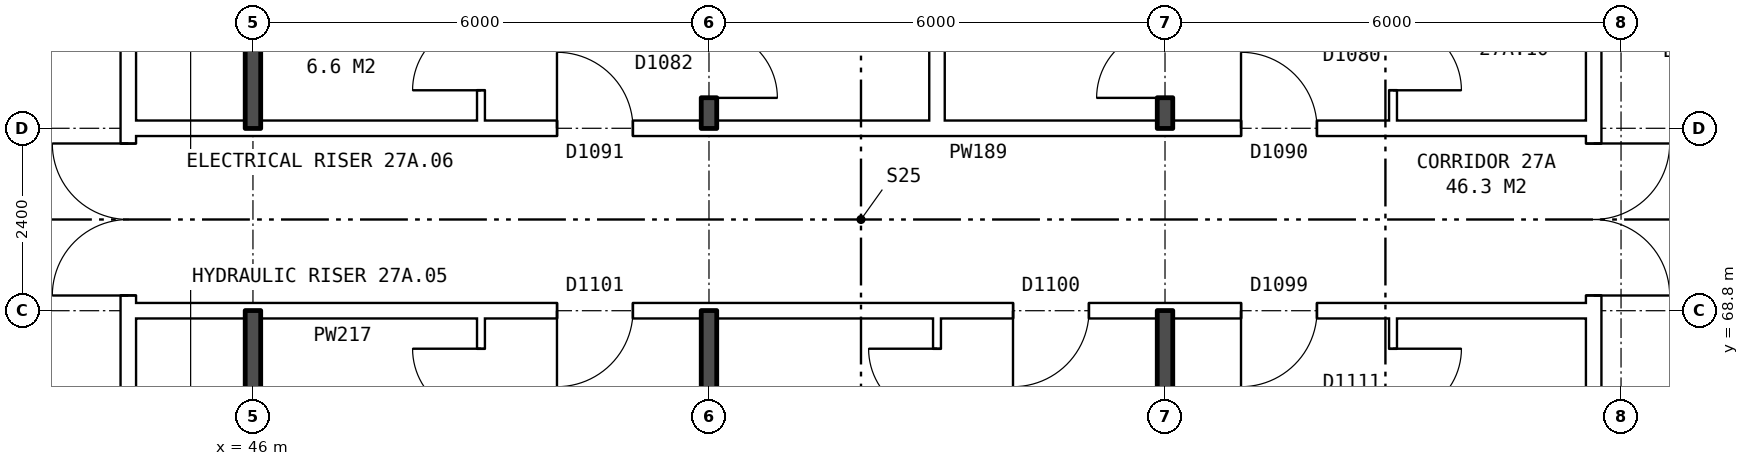
"""IFC4 building model, lengths in metres.
Left out: names, types, materials, properties, quantities, classifications, styles, units other than length and angle.
Written with IfcOpenShell. Run it as: python <this file> out.ifc"""

import sys

from ifc_helpers import new_model, si_unit, direction, frame, frame_2d, origin, place, context, subcontext, project, spatial, rectangle, extrude, element, fill, save


model = new_model("IFC4")
c1 = context("Model", 3, precision=1e-05, world=origin(), true_north=direction((0.0, 1.0)))
c2 = subcontext(c1, "Body", "Model", "MODEL_VIEW")
j1 = project(units=[si_unit("LENGTHUNIT", "METRE"), si_unit("PLANEANGLEUNIT", "RADIAN")], contexts=[c1])
p1 = place(None, origin())
s1 = spatial("IfcSite", under=j1, at=p1, CompositionType="ELEMENT")
p2 = place(p1, origin())
s2 = spatial("IfcBuilding", under=s1, at=p2, CompositionType="ELEMENT")
p3 = place(p2, frame((0.0, 0.0, 99.5)))
s3 = spatial("IfcBuildingStorey", under=s2, at=p3, CompositionType="ELEMENT", Elevation=99.5)
p4 = place(p3, frame((63.64, 63.9, 0.0), z_axis=(0.0, 0.0, 1.0), x_axis=(0.0, 1.0, 0.0)))
e1 = element("IfcWall", 1, at=p4, inside=s3, PredefinedType="PARTITIONING", context=c2, shape_type="SweptSolid", body=[
    extrude(rectangle(XDim=12.2, YDim=0.2, at=frame_2d((6.1, 0.0))), origin(), (0.0, 0.0, 1.0), 2.85),
])
p5 = place(p4, frame((5.1, 0.0, 0.0)))
e2 = element("IfcOpeningElement", 2, at=p5, cuts=e1, PredefinedType="OPENING", context=c2, shape_type="SweptSolid", body=[
    extrude(rectangle(XDim=2.0, YDim=2.1, at=frame_2d((1.0, 1.05))), frame((0.0, 0.11, 0.0), z_axis=(0.0, -1.0, 0.0), x_axis=(1.0, 0.0, 0.0)), (0.0, 0.0, 1.0), 0.22),
])
p6 = place(p3, frame((44.36, 63.9, 0.0), z_axis=(0.0, 0.0, 1.0), x_axis=(0.0, 1.0, 0.0)))
e3 = element("IfcWall", 3, at=p6, inside=s3, PredefinedType="PARTITIONING", context=c2, shape_type="SweptSolid", body=[
    extrude(rectangle(XDim=12.2, YDim=0.2, at=frame_2d((6.1, 0.0))), origin(), (0.0, 0.0, 1.0), 2.85),
])
p7 = place(p6, frame((5.1, 0.0, 0.0)))
e4 = element("IfcOpeningElement", 4, at=p7, cuts=e3, PredefinedType="OPENING", context=c2, shape_type="SweptSolid", body=[
    extrude(rectangle(XDim=2.0, YDim=2.1, at=frame_2d((1.0, 1.05))), frame((0.0, 0.11, 0.0), z_axis=(0.0, -1.0, 0.0), x_axis=(1.0, 0.0, 0.0)), (0.0, 0.0, 1.0), 0.22),
])
p8 = place(p3, frame((44.36, 68.8, 0.0), z_axis=(0.0, 0.0, 1.0), x_axis=(1.0, 0.0, 0.0)))
e5 = element("IfcWall", 5, at=p8, inside=s3, PredefinedType="PARTITIONING", context=c2, shape_type="SweptSolid", body=[
    extrude(rectangle(XDim=19.28, YDim=0.2, at=frame_2d((9.64, 0.0))), origin(), (0.0, 0.0, 1.0), 2.85),
])
p9 = place(p8, frame((14.64, 0.0, 0.0)))
e6 = element("IfcOpeningElement", 6, at=p9, cuts=e5, PredefinedType="OPENING", context=c2, shape_type="SweptSolid", body=[
    extrude(rectangle(XDim=1.0, YDim=2.1, at=frame_2d((0.5, 1.05))), frame((0.0, 0.11, 0.0), z_axis=(0.0, -1.0, 0.0), x_axis=(1.0, 0.0, 0.0)), (0.0, 0.0, 1.0), 0.22),
])
p10 = place(p8, frame((11.64, 0.0, 0.0)))
e7 = element("IfcOpeningElement", 7, at=p10, cuts=e5, PredefinedType="OPENING", context=c2, shape_type="SweptSolid", body=[
    extrude(rectangle(XDim=1.0, YDim=2.1, at=frame_2d((0.5, 1.05))), frame((0.0, 0.11, 0.0), z_axis=(0.0, -1.0, 0.0), x_axis=(1.0, 0.0, 0.0)), (0.0, 0.0, 1.0), 0.22),
])
p11 = place(p8, frame((5.64, 0.0, 0.0)))
e8 = element("IfcOpeningElement", 8, at=p11, cuts=e5, PredefinedType="OPENING", context=c2, shape_type="SweptSolid", body=[
    extrude(rectangle(XDim=1.0, YDim=2.1, at=frame_2d((0.5, 1.05))), frame((0.0, 0.11, 0.0), z_axis=(0.0, -1.0, 0.0), x_axis=(1.0, 0.0, 0.0)), (0.0, 0.0, 1.0), 0.22),
])
p12 = place(p3, frame((44.36, 71.2, 0.0), z_axis=(0.0, 0.0, 1.0), x_axis=(1.0, 0.0, 0.0)))
e9 = element("IfcWall", 9, at=p12, inside=s3, PredefinedType="PARTITIONING", context=c2, shape_type="SweptSolid", body=[
    extrude(rectangle(XDim=19.28, YDim=0.2, at=frame_2d((9.64, 0.0))), origin(), (0.0, 0.0, 1.0), 2.85),
])
p13 = place(p12, frame((14.64, 0.0, 0.0)))
e10 = element("IfcOpeningElement", 10, at=p13, cuts=e9, PredefinedType="OPENING", context=c2, shape_type="SweptSolid", body=[
    extrude(rectangle(XDim=1.0, YDim=2.1, at=frame_2d((0.5, 1.05))), frame((0.0, 0.11, 0.0), z_axis=(0.0, -1.0, 0.0), x_axis=(1.0, 0.0, 0.0)), (0.0, 0.0, 1.0), 0.22),
])
p14 = place(p12, frame((5.64, 0.0, 0.0)))
e11 = element("IfcOpeningElement", 11, at=p14, cuts=e9, PredefinedType="OPENING", context=c2, shape_type="SweptSolid", body=[
    extrude(rectangle(XDim=1.0, YDim=2.1, at=frame_2d((0.5, 1.05))), frame((0.0, 0.11, 0.0), z_axis=(0.0, -1.0, 0.0), x_axis=(1.0, 0.0, 0.0)), (0.0, 0.0, 1.0), 0.22),
])
for number, where, z_axis, x_axis in (
    (12, (46.0, 63.8, 0.0), (0.0, 0.0, 1.0), (0.0, 1.0, 0.0)),
    (13, (46.0, 71.2, 0.0), (0.0, 0.0, 1.0), (0.0, 1.0, 0.0)),
):
    element("IfcWall", number, at=place(p3, frame(where, z_axis=z_axis, x_axis=x_axis)), inside=s3, PredefinedType="SOLIDWALL", context=c2, shape_type="SweptSolid", body=[
        extrude(rectangle(XDim=5.0, YDim=0.2, at=frame_2d((2.5, 0.0))), origin(), (0.0, 0.0, 1.0), 2.85),
    ])
p15 = place(p3, frame((49.0, 54.36, 0.0), z_axis=(0.0, 0.0, 1.0), x_axis=(0.0, 1.0, 0.0)))
e14 = element("IfcWall", 14, at=p15, inside=s3, PredefinedType="PARTITIONING", context=c2, shape_type="SweptSolid", body=[
    extrude(rectangle(XDim=14.34, YDim=0.1, at=frame_2d((7.17, 0.0))), origin(), (0.0, 0.0, 1.0), 2.85),
])
p16 = place(p15, frame((7.7, 0.0, 0.0)))
e15 = element("IfcOpeningElement", 15, at=p16, cuts=e14, PredefinedType="OPENING", context=c2, shape_type="SweptSolid", body=[
    extrude(rectangle(XDim=0.9, YDim=2.1, at=frame_2d((0.45, 1.05))), frame((0.0, 0.06, 0.0), z_axis=(0.0, -1.0, 0.0), x_axis=(1.0, 0.0, 0.0)), (0.0, 0.0, 1.0), 0.12),
])
p17 = place(p15, frame((13.04, 0.0, 0.0)))
e16 = element("IfcOpeningElement", 16, at=p17, cuts=e14, PredefinedType="OPENING", context=c2, shape_type="SweptSolid", body=[
    extrude(rectangle(XDim=0.9, YDim=2.1, at=frame_2d((0.45, 1.05))), frame((0.0, 0.06, 0.0), z_axis=(0.0, -1.0, 0.0), x_axis=(1.0, 0.0, 0.0)), (0.0, 0.0, 1.0), 0.12),
])
p18 = place(p3, frame((49.0, 71.3, 0.0), z_axis=(0.0, 0.0, 1.0), x_axis=(0.0, 1.0, 0.0)))
e17 = element("IfcWall", 17, at=p18, inside=s3, PredefinedType="PARTITIONING", context=c2, shape_type="SweptSolid", body=[
    extrude(rectangle(XDim=14.34, YDim=0.1, at=frame_2d((7.17, 0.0))), origin(), (0.0, 0.0, 1.0), 2.85),
])
p19 = place(p18, frame((7.94, 0.0, 0.0)))
e18 = element("IfcOpeningElement", 18, at=p19, cuts=e17, PredefinedType="OPENING", context=c2, shape_type="SweptSolid", body=[
    extrude(rectangle(XDim=0.9, YDim=2.1, at=frame_2d((0.45, 1.05))), frame((0.0, 0.06, 0.0), z_axis=(0.0, -1.0, 0.0), x_axis=(1.0, 0.0, 0.0)), (0.0, 0.0, 1.0), 0.12),
])
p20 = place(p18, frame((0.4, 0.0, 0.0)))
e19 = element("IfcOpeningElement", 19, at=p20, cuts=e17, PredefinedType="OPENING", context=c2, shape_type="SweptSolid", body=[
    extrude(rectangle(XDim=0.9, YDim=2.1, at=frame_2d((0.45, 1.05))), frame((0.0, 0.06, 0.0), z_axis=(0.0, -1.0, 0.0), x_axis=(1.0, 0.0, 0.0)), (0.0, 0.0, 1.0), 0.12),
])
p21 = place(p3, frame((52.0, 54.36, 0.0), z_axis=(0.0, 0.0, 1.0), x_axis=(0.0, 1.0, 0.0)))
e20 = element("IfcWall", 20, at=p21, inside=s3, PredefinedType="SOLIDWALL", context=c2, shape_type="SweptSolid", body=[
    extrude(rectangle(XDim=14.44, YDim=0.2, at=frame_2d((7.22, 0.0))), origin(), (0.0, 0.0, 1.0), 2.85),
])
p22 = place(p3, frame((52.0, 71.2, 0.0), z_axis=(0.0, 0.0, 1.0), x_axis=(0.0, 1.0, 0.0)))
e21 = element("IfcWall", 21, at=p22, inside=s3, PredefinedType="SOLIDWALL", context=c2, shape_type="SweptSolid", body=[
    extrude(rectangle(XDim=14.44, YDim=0.2, at=frame_2d((7.22, 0.0))), origin(), (0.0, 0.0, 1.0), 2.85),
])
p23 = place(p22, frame((8.04, 0.0, 0.0)))
e22 = element("IfcOpeningElement", 22, at=p23, cuts=e21, PredefinedType="OPENING", context=c2, shape_type="SweptSolid", body=[
    extrude(rectangle(XDim=0.9, YDim=2.1, at=frame_2d((0.45, 1.05))), frame((0.0, 0.11, 0.0), z_axis=(0.0, -1.0, 0.0), x_axis=(1.0, 0.0, 0.0)), (0.0, 0.0, 1.0), 0.22),
])
p24 = place(p22, frame((0.4, 0.0, 0.0)))
e23 = element("IfcOpeningElement", 23, at=p24, cuts=e21, PredefinedType="OPENING", context=c2, shape_type="SweptSolid", body=[
    extrude(rectangle(XDim=0.9, YDim=2.1, at=frame_2d((0.45, 1.05))), frame((0.0, 0.11, 0.0), z_axis=(0.0, -1.0, 0.0), x_axis=(1.0, 0.0, 0.0)), (0.0, 0.0, 1.0), 0.22),
])
p25 = place(p3, frame((55.0, 54.36, 0.0), z_axis=(0.0, 0.0, 1.0), x_axis=(0.0, 1.0, 0.0)))
e24 = element("IfcWall", 24, at=p25, inside=s3, PredefinedType="PARTITIONING", context=c2, shape_type="SweptSolid", body=[
    extrude(rectangle(XDim=14.34, YDim=0.1, at=frame_2d((7.17, 0.0))), origin(), (0.0, 0.0, 1.0), 2.85),
])
p26 = place(p25, frame((4.2, 0.0, 0.0)))
e25 = element("IfcOpeningElement", 25, at=p26, cuts=e24, PredefinedType="OPENING", context=c2, shape_type="SweptSolid", body=[
    extrude(rectangle(XDim=0.9, YDim=2.1, at=frame_2d((0.45, 1.05))), frame((0.0, 0.06, 0.0), z_axis=(0.0, -1.0, 0.0), x_axis=(1.0, 0.0, 0.0)), (0.0, 0.0, 1.0), 0.12),
])
p27 = place(p25, frame((13.04, 0.0, 0.0)))
e26 = element("IfcOpeningElement", 26, at=p27, cuts=e24, PredefinedType="OPENING", context=c2, shape_type="SweptSolid", body=[
    extrude(rectangle(XDim=0.9, YDim=2.1, at=frame_2d((0.45, 1.05))), frame((0.0, 0.06, 0.0), z_axis=(0.0, -1.0, 0.0), x_axis=(1.0, 0.0, 0.0)), (0.0, 0.0, 1.0), 0.12),
])
p28 = place(p3, frame((55.0, 71.3, 0.0), z_axis=(0.0, 0.0, 1.0), x_axis=(0.0, 1.0, 0.0)))
e27 = element("IfcWall", 27, at=p28, inside=s3, PredefinedType="PARTITIONING", context=c2, shape_type="SweptSolid", body=[
    extrude(rectangle(XDim=14.34, YDim=0.2, at=frame_2d((7.17, 0.0))), origin(), (0.0, 0.0, 1.0), 2.85),
])
p29 = place(p3, frame((58.0, 54.36, 0.0), z_axis=(0.0, 0.0, 1.0), x_axis=(0.0, 1.0, 0.0)))
e28 = element("IfcWall", 28, at=p29, inside=s3, PredefinedType="SOLIDWALL", context=c2, shape_type="SweptSolid", body=[
    extrude(rectangle(XDim=14.44, YDim=0.2, at=frame_2d((7.22, 0.0))), origin(), (0.0, 0.0, 1.0), 2.85),
])
p30 = place(p3, frame((58.0, 71.2, 0.0), z_axis=(0.0, 0.0, 1.0), x_axis=(0.0, 1.0, 0.0)))
e29 = element("IfcWall", 29, at=p30, inside=s3, PredefinedType="SOLIDWALL", context=c2, shape_type="SweptSolid", body=[
    extrude(rectangle(XDim=14.44, YDim=0.2, at=frame_2d((7.22, 0.0))), origin(), (0.0, 0.0, 1.0), 2.85),
])
p31 = place(p30, frame((9.34, 0.0, 0.0)))
e30 = element("IfcOpeningElement", 30, at=p31, cuts=e29, PredefinedType="OPENING", context=c2, shape_type="SweptSolid", body=[
    extrude(rectangle(XDim=0.9, YDim=2.1, at=frame_2d((0.45, 1.05))), frame((0.0, 0.11, 0.0), z_axis=(0.0, -1.0, 0.0), x_axis=(1.0, 0.0, 0.0)), (0.0, 0.0, 1.0), 0.22),
])
p32 = place(p30, frame((0.4, 0.0, 0.0)))
e31 = element("IfcOpeningElement", 31, at=p32, cuts=e29, PredefinedType="OPENING", context=c2, shape_type="SweptSolid", body=[
    extrude(rectangle(XDim=0.9, YDim=2.1, at=frame_2d((0.45, 1.05))), frame((0.0, 0.11, 0.0), z_axis=(0.0, -1.0, 0.0), x_axis=(1.0, 0.0, 0.0)), (0.0, 0.0, 1.0), 0.22),
])
p33 = place(p3, frame((61.0, 54.36, 0.0), z_axis=(0.0, 0.0, 1.0), x_axis=(0.0, 1.0, 0.0)))
e32 = element("IfcWall", 32, at=p33, inside=s3, PredefinedType="PARTITIONING", context=c2, shape_type="SweptSolid", body=[
    extrude(rectangle(XDim=14.34, YDim=0.1, at=frame_2d((7.17, 0.0))), origin(), (0.0, 0.0, 1.0), 2.85),
])
p34 = place(p33, frame((4.2, 0.0, 0.0)))
e33 = element("IfcOpeningElement", 33, at=p34, cuts=e32, PredefinedType="OPENING", context=c2, shape_type="SweptSolid", body=[
    extrude(rectangle(XDim=0.9, YDim=2.1, at=frame_2d((0.45, 1.05))), frame((0.0, 0.06, 0.0), z_axis=(0.0, -1.0, 0.0), x_axis=(1.0, 0.0, 0.0)), (0.0, 0.0, 1.0), 0.12),
])
p35 = place(p33, frame((13.04, 0.0, 0.0)))
e34 = element("IfcOpeningElement", 34, at=p35, cuts=e32, PredefinedType="OPENING", context=c2, shape_type="SweptSolid", body=[
    extrude(rectangle(XDim=0.9, YDim=2.1, at=frame_2d((0.45, 1.05))), frame((0.0, 0.06, 0.0), z_axis=(0.0, -1.0, 0.0), x_axis=(1.0, 0.0, 0.0)), (0.0, 0.0, 1.0), 0.12),
])
p36 = place(p3, frame((61.0, 71.3, 0.0), z_axis=(0.0, 0.0, 1.0), x_axis=(0.0, 1.0, 0.0)))
e35 = element("IfcWall", 35, at=p36, inside=s3, PredefinedType="PARTITIONING", context=c2, shape_type="SweptSolid", body=[
    extrude(rectangle(XDim=14.34, YDim=0.1, at=frame_2d((7.17, 0.0))), origin(), (0.0, 0.0, 1.0), 2.85),
])
p37 = place(p36, frame((9.24, 0.0, 0.0)))
e36 = element("IfcOpeningElement", 36, at=p37, cuts=e35, PredefinedType="OPENING", context=c2, shape_type="SweptSolid", body=[
    extrude(rectangle(XDim=0.9, YDim=2.1, at=frame_2d((0.45, 1.05))), frame((0.0, 0.06, 0.0), z_axis=(0.0, -1.0, 0.0), x_axis=(1.0, 0.0, 0.0)), (0.0, 0.0, 1.0), 0.12),
])
p38 = place(p36, frame((0.4, 0.0, 0.0)))
e37 = element("IfcOpeningElement", 37, at=p38, cuts=e35, PredefinedType="OPENING", context=c2, shape_type="SweptSolid", body=[
    extrude(rectangle(XDim=0.9, YDim=2.1, at=frame_2d((0.45, 1.05))), frame((0.0, 0.06, 0.0), z_axis=(0.0, -1.0, 0.0), x_axis=(1.0, 0.0, 0.0)), (0.0, 0.0, 1.0), 0.12),
])
p39 = place(p5, frame((2.0, 0.0, 0.0), z_axis=(0.0, 0.0, 1.0), x_axis=(-1.0, 0.0, 0.0)))
e38 = element("IfcDoor", 38, at=p39, inside=s3, OperationType="DOUBLE_DOOR_SINGLE_SWING", PredefinedType="DOOR", context=c2, shape_type="SweptSolid", body=[
    extrude(rectangle(XDim=2.0, YDim=2.1, at=frame_2d((1.0, 1.05))), frame((0.0, 0.025, 0.0), z_axis=(0.0, -1.0, 0.0), x_axis=(1.0, 0.0, 0.0)), (0.0, 0.0, 1.0), 0.05),
])
fill(e2, e38)
p40 = place(p7, origin())
e39 = element("IfcDoor", 39, at=p40, inside=s3, OperationType="DOUBLE_DOOR_SINGLE_SWING", PredefinedType="DOOR", context=c2, shape_type="SweptSolid", body=[
    extrude(rectangle(XDim=2.0, YDim=2.1, at=frame_2d((1.0, 1.05))), frame((0.0, 0.025, 0.0), z_axis=(0.0, -1.0, 0.0), x_axis=(1.0, 0.0, 0.0)), (0.0, 0.0, 1.0), 0.05),
])
fill(e4, e39)
p41 = place(p9, frame((1.0, 0.0, 0.0), z_axis=(0.0, 0.0, 1.0), x_axis=(-1.0, 0.0, 0.0)))
e40 = element("IfcDoor", 40, at=p41, inside=s3, OperationType="SINGLE_SWING_RIGHT", PredefinedType="DOOR", context=c2, shape_type="SweptSolid", body=[
    extrude(rectangle(XDim=1.0, YDim=2.1, at=frame_2d((0.5, 1.05))), frame((0.0, 0.025, 0.0), z_axis=(0.0, -1.0, 0.0), x_axis=(1.0, 0.0, 0.0)), (0.0, 0.0, 1.0), 0.05),
])
fill(e6, e40)
p42 = place(p35, frame((0.9, 0.0, 0.0), z_axis=(0.0, 0.0, 1.0), x_axis=(-1.0, 0.0, 0.0)))
e41 = element("IfcDoor", 41, at=p42, inside=s3, OperationType="SINGLE_SWING_LEFT", PredefinedType="DOOR", context=c2, shape_type="SweptSolid", body=[
    extrude(rectangle(XDim=0.9, YDim=2.1, at=frame_2d((0.45, 1.05))), frame((0.0, 0.025, 0.0), z_axis=(0.0, -1.0, 0.0), x_axis=(1.0, 0.0, 0.0)), (0.0, 0.0, 1.0), 0.05),
])
fill(e34, e41)
p43 = place(p10, frame((1.0, 0.0, 0.0), z_axis=(0.0, 0.0, 1.0), x_axis=(-1.0, 0.0, 0.0)))
e42 = element("IfcDoor", 42, at=p43, inside=s3, OperationType="SINGLE_SWING_RIGHT", PredefinedType="DOOR", context=c2, shape_type="SweptSolid", body=[
    extrude(rectangle(XDim=1.0, YDim=2.1, at=frame_2d((0.5, 1.05))), frame((0.0, 0.025, 0.0), z_axis=(0.0, -1.0, 0.0), x_axis=(1.0, 0.0, 0.0)), (0.0, 0.0, 1.0), 0.05),
])
fill(e7, e42)
p44 = place(p27, origin())
e43 = element("IfcDoor", 43, at=p44, inside=s3, OperationType="SINGLE_SWING_RIGHT", PredefinedType="DOOR", context=c2, shape_type="SweptSolid", body=[
    extrude(rectangle(XDim=0.9, YDim=2.1, at=frame_2d((0.45, 1.05))), frame((0.0, 0.025, 0.0), z_axis=(0.0, -1.0, 0.0), x_axis=(1.0, 0.0, 0.0)), (0.0, 0.0, 1.0), 0.05),
])
fill(e26, e43)
p45 = place(p11, frame((1.0, 0.0, 0.0), z_axis=(0.0, 0.0, 1.0), x_axis=(-1.0, 0.0, 0.0)))
e44 = element("IfcDoor", 44, at=p45, inside=s3, OperationType="SINGLE_SWING_RIGHT", PredefinedType="DOOR", context=c2, shape_type="SweptSolid", body=[
    extrude(rectangle(XDim=1.0, YDim=2.1, at=frame_2d((0.5, 1.05))), frame((0.0, 0.025, 0.0), z_axis=(0.0, -1.0, 0.0), x_axis=(1.0, 0.0, 0.0)), (0.0, 0.0, 1.0), 0.05),
])
fill(e8, e44)
p46 = place(p17, origin())
e45 = element("IfcDoor", 45, at=p46, inside=s3, OperationType="SINGLE_SWING_RIGHT", PredefinedType="DOOR", context=c2, shape_type="SweptSolid", body=[
    extrude(rectangle(XDim=0.9, YDim=2.1, at=frame_2d((0.45, 1.05))), frame((0.0, 0.025, 0.0), z_axis=(0.0, -1.0, 0.0), x_axis=(1.0, 0.0, 0.0)), (0.0, 0.0, 1.0), 0.05),
])
fill(e16, e45)
p47 = place(p13, origin())
e46 = element("IfcDoor", 46, at=p47, inside=s3, OperationType="SINGLE_SWING_LEFT", PredefinedType="DOOR", context=c2, shape_type="SweptSolid", body=[
    extrude(rectangle(XDim=1.0, YDim=2.1, at=frame_2d((0.5, 1.05))), frame((0.0, 0.025, 0.0), z_axis=(0.0, -1.0, 0.0), x_axis=(1.0, 0.0, 0.0)), (0.0, 0.0, 1.0), 0.05),
])
fill(e10, e46)
p48 = place(p38, frame((0.9, 0.0, 0.0), z_axis=(0.0, 0.0, 1.0), x_axis=(-1.0, 0.0, 0.0)))
e47 = element("IfcDoor", 47, at=p48, inside=s3, OperationType="SINGLE_SWING_RIGHT", PredefinedType="DOOR", context=c2, shape_type="SweptSolid", body=[
    extrude(rectangle(XDim=0.9, YDim=2.1, at=frame_2d((0.45, 1.05))), frame((0.0, 0.025, 0.0), z_axis=(0.0, -1.0, 0.0), x_axis=(1.0, 0.0, 0.0)), (0.0, 0.0, 1.0), 0.05),
])
fill(e37, e47)
p49 = place(p32, origin())
e48 = element("IfcDoor", 48, at=p49, inside=s3, OperationType="SINGLE_SWING_LEFT", PredefinedType="DOOR", context=c2, shape_type="SweptSolid", body=[
    extrude(rectangle(XDim=0.9, YDim=2.1, at=frame_2d((0.45, 1.05))), frame((0.0, 0.025, 0.0), z_axis=(0.0, -1.0, 0.0), x_axis=(1.0, 0.0, 0.0)), (0.0, 0.0, 1.0), 0.05),
])
fill(e31, e48)
p50 = place(p14, origin())
e49 = element("IfcDoor", 49, at=p50, inside=s3, OperationType="SINGLE_SWING_LEFT", PredefinedType="DOOR", context=c2, shape_type="SweptSolid", body=[
    extrude(rectangle(XDim=1.0, YDim=2.1, at=frame_2d((0.5, 1.05))), frame((0.0, 0.025, 0.0), z_axis=(0.0, -1.0, 0.0), x_axis=(1.0, 0.0, 0.0)), (0.0, 0.0, 1.0), 0.05),
])
fill(e11, e49)
p51 = place(p24, frame((0.9, 0.0, 0.0), z_axis=(0.0, 0.0, 1.0), x_axis=(-1.0, 0.0, 0.0)))
e50 = element("IfcDoor", 50, at=p51, inside=s3, OperationType="SINGLE_SWING_RIGHT", PredefinedType="DOOR", context=c2, shape_type="SweptSolid", body=[
    extrude(rectangle(XDim=0.9, YDim=2.1, at=frame_2d((0.45, 1.05))), frame((0.0, 0.025, 0.0), z_axis=(0.0, -1.0, 0.0), x_axis=(1.0, 0.0, 0.0)), (0.0, 0.0, 1.0), 0.05),
])
fill(e23, e50)
p52 = place(p20, origin())
e51 = element("IfcDoor", 51, at=p52, inside=s3, OperationType="SINGLE_SWING_LEFT", PredefinedType="DOOR", context=c2, shape_type="SweptSolid", body=[
    extrude(rectangle(XDim=0.9, YDim=2.1, at=frame_2d((0.45, 1.05))), frame((0.0, 0.025, 0.0), z_axis=(0.0, -1.0, 0.0), x_axis=(1.0, 0.0, 0.0)), (0.0, 0.0, 1.0), 0.05),
])
fill(e19, e51)
save(model, sys.argv[1])
